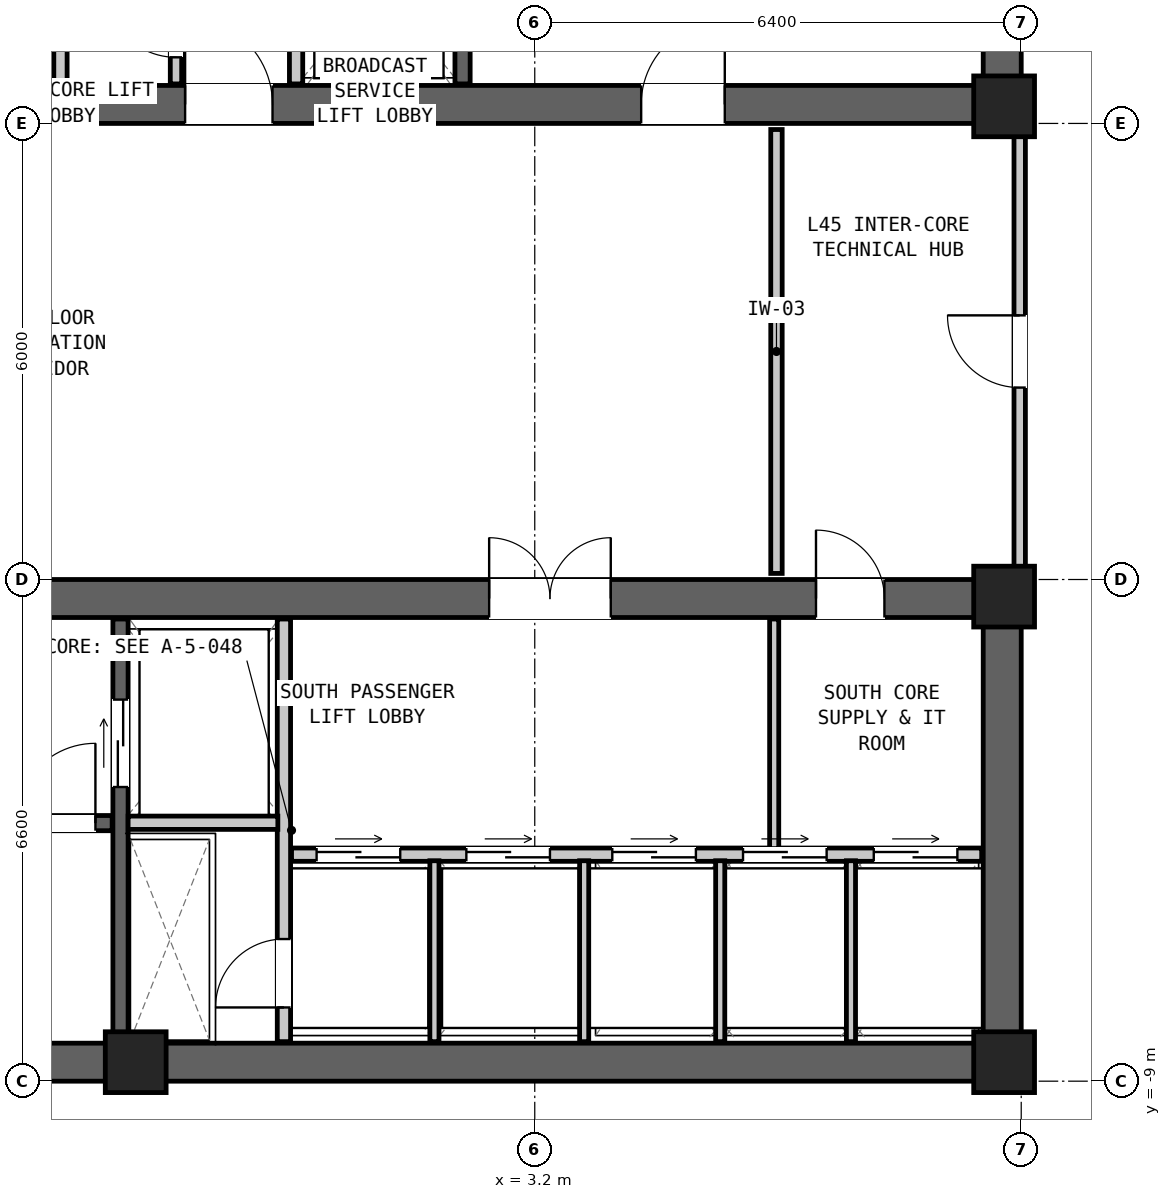
"""IFC4 building model, lengths in metres.
Left out: names, types, materials, properties, quantities, classifications, styles, units other than length and angle.
Written with IfcOpenShell. Run it as: python <this file> out.ifc"""

import sys

from ifc_helpers import new_model, si_unit, direction, frame, frame_2d, origin, origin_2d, place, context, subcontext, project, spatial, rectangle, extrude, element, fill, save


model = new_model("IFC4")
c1 = context("Model", 3, precision=1e-05, world=origin(), true_north=direction((0.0, 1.0)))
c2 = subcontext(c1, "Body", "Model", "MODEL_VIEW")
j1 = project(units=[si_unit("LENGTHUNIT", "METRE"), si_unit("PLANEANGLEUNIT", "RADIAN")], contexts=[c1])
p1 = place(None, origin())
s1 = spatial("IfcSite", under=j1, at=p1, CompositionType="ELEMENT")
p2 = place(p1, origin())
s2 = spatial("IfcBuilding", under=s1, at=p2, CompositionType="ELEMENT")
p3 = place(p2, frame((0.0, 0.0, 156.15)))
s3 = spatial("IfcBuildingStorey", under=s2, at=p3, CompositionType="ELEMENT", Elevation=156.15)
p4 = place(p3, frame((-9.6, 3.85, 0.0), z_axis=(0.0, 0.0, 1.0), x_axis=(1.0, 0.0, 0.0)))
e1 = element("IfcWall", 1, at=p4, inside=s3, PredefinedType="SHEAR", context=c2, shape_type="SweptSolid", body=[
    extrude(rectangle(XDim=19.2, YDim=0.5, at=frame_2d((9.6, 0.0))), origin(), (0.0, 0.0, 1.0), 3.05),
])
p5 = place(p4, frame((14.2, 0.0, 0.0)))
e2 = element("IfcOpeningElement", 2, at=p5, cuts=e1, PredefinedType="OPENING", context=c2, shape_type="SweptSolid", body=[
    extrude(rectangle(XDim=1.1, YDim=2.08, at=frame_2d((0.55, 1.04))), frame((0.0, 0.262, 0.0), z_axis=(0.0, -1.0, 0.0), x_axis=(1.0, 0.0, 0.0)), (0.0, 0.0, 1.0), 0.524),
])
p6 = place(p4, frame((8.2, 0.0, 0.0)))
e3 = element("IfcOpeningElement", 3, at=p6, cuts=e1, PredefinedType="OPENING", context=c2, shape_type="SweptSolid", body=[
    extrude(rectangle(XDim=1.15, YDim=2.1, at=frame_2d((0.575, 1.05))), frame((0.0, 0.262, 0.0), z_axis=(0.0, -1.0, 0.0), x_axis=(1.0, 0.0, 0.0)), (0.0, 0.0, 1.0), 0.524),
])
p7 = place(p4, frame((2.5, 0.0, 0.0)))
e4 = element("IfcOpeningElement", 4, at=p7, cuts=e1, PredefinedType="OPENING", context=c2, shape_type="SweptSolid", body=[
    extrude(rectangle(XDim=1.6, YDim=2.12, at=frame_2d((0.8, 1.06))), frame((0.0, 0.262, 0.0), z_axis=(0.0, -1.0, 0.0), x_axis=(1.0, 0.0, 0.0)), (0.0, 0.0, 1.0), 0.524),
])
p8 = place(p3, frame((9.35, 3.6, 0.0), z_axis=(0.0, 0.0, 1.0), x_axis=(0.0, 1.0, 0.0)))
e5 = element("IfcWall", 5, at=p8, inside=s3, PredefinedType="SHEAR", context=c2, shape_type="SweptSolid", body=[
    extrude(rectangle(XDim=6.6, YDim=0.5, at=frame_2d((3.3, 0.0))), origin(), (0.0, 0.0, 1.0), 3.05),
])
p9 = place(p3, frame((-9.6, -8.75, 0.0), z_axis=(0.0, 0.0, 1.0), x_axis=(1.0, 0.0, 0.0)))
e6 = element("IfcWall", 6, at=p9, inside=s3, PredefinedType="SHEAR", context=c2, shape_type="SweptSolid", body=[
    extrude(rectangle(XDim=19.2, YDim=0.5, at=frame_2d((9.6, 0.0))), origin(), (0.0, 0.0, 1.0), 3.05),
])
p10 = place(p3, frame((-9.6, -2.65, 0.0), z_axis=(0.0, 0.0, 1.0), x_axis=(1.0, 0.0, 0.0)))
e7 = element("IfcWall", 7, at=p10, inside=s3, PredefinedType="SHEAR", context=c2, shape_type="SweptSolid", body=[
    extrude(rectangle(XDim=19.2, YDim=0.5, at=frame_2d((9.6, 0.0))), origin(), (0.0, 0.0, 1.0), 3.05),
])
p11 = place(p10, frame((3.8, 0.0, 0.0)))
e8 = element("IfcOpeningElement", 8, at=p11, cuts=e7, PredefinedType="OPENING", context=c2, shape_type="SweptSolid", body=[
    extrude(rectangle(XDim=1.1, YDim=2.08, at=frame_2d((0.55, 1.04))), frame((0.0, 0.262, 0.0), z_axis=(0.0, -1.0, 0.0), x_axis=(1.0, 0.0, 0.0)), (0.0, 0.0, 1.0), 0.524),
])
p12 = place(p10, frame((12.2, 0.0, 0.0)))
e9 = element("IfcOpeningElement", 9, at=p12, cuts=e7, PredefinedType="OPENING", context=c2, shape_type="SweptSolid", body=[
    extrude(rectangle(XDim=1.6, YDim=2.12, at=frame_2d((0.8, 1.06))), frame((0.0, 0.262, 0.0), z_axis=(0.0, -1.0, 0.0), x_axis=(1.0, 0.0, 0.0)), (0.0, 0.0, 1.0), 0.524),
])
p13 = place(p10, frame((16.5, 0.0, 0.0)))
e10 = element("IfcOpeningElement", 10, at=p13, cuts=e7, PredefinedType="OPENING", context=c2, shape_type="SweptSolid", body=[
    extrude(rectangle(XDim=0.9, YDim=2.05, at=frame_2d((0.45, 1.025))), frame((0.0, 0.262, 0.0), z_axis=(0.0, -1.0, 0.0), x_axis=(1.0, 0.0, 0.0)), (0.0, 0.0, 1.0), 0.524),
])
p14 = place(p3, frame((9.35, -9.0, 0.0), z_axis=(0.0, 0.0, 1.0), x_axis=(0.0, 1.0, 0.0)))
e11 = element("IfcWall", 11, at=p14, inside=s3, PredefinedType="SHEAR", context=c2, shape_type="SweptSolid", body=[
    extrude(rectangle(XDim=6.6, YDim=0.5, at=frame_2d((3.3, 0.0))), origin(), (0.0, 0.0, 1.0), 3.05),
])
for number, where, z_axis, x_axis in (
    (12, (9.375, 3.825, 0.0), (0.0, 0.0, 1.0), (1.0, 0.0, 0.0)),
    (13, (9.375, -2.625, 0.0), (0.0, 0.0, 1.0), (1.0, 0.0, 0.0)),
    (14, (-2.05, -8.75, 0.0), (0.0, 0.0, 1.0), (1.0, 0.0, 0.0)),
    (15, (9.375, -8.75, 0.0), (0.0, 0.0, 1.0), (1.0, 0.0, 0.0)),
):
    element("IfcColumn", number, at=place(p3, frame(where, z_axis=z_axis, x_axis=x_axis)), inside=s3, PredefinedType="COLUMN", context=c2, shape_type="SweptSolid", body=[
        extrude(rectangle(XDim=0.8, YDim=0.8, at=origin_2d()), origin(), (0.0, 0.0, 1.0), 3.05),
    ])
p15 = place(p3, frame((2.25, 4.12, 0.0), z_axis=(0.0, 0.0, 1.0), x_axis=(0.0, 1.0, 0.0)))
e16 = element("IfcWall", 16, at=p15, inside=s3, PredefinedType="SHEAR", context=c2, shape_type="SweptSolid", body=[
    extrude(rectangle(XDim=5.56, YDim=0.2, at=frame_2d((2.78, 0.0))), origin(), (0.0, 0.0, 1.0), 2.83),
])
p16 = place(p15, frame((0.65, 0.0, 0.0)))
e17 = element("IfcOpeningElement", 17, at=p16, cuts=e16, PredefinedType="OPENING", context=c2, shape_type="SweptSolid", body=[
    extrude(rectangle(XDim=1.15, YDim=2.08, at=frame_2d((0.575, 1.04))), frame((0.0, 0.112, 0.0), z_axis=(0.0, -1.0, 0.0), x_axis=(1.0, 0.0, 0.0)), (0.0, 0.0, 1.0), 0.224),
])
p17 = place(p3, frame((0.06, 4.12, 0.0), z_axis=(0.0, 0.0, 1.0), x_axis=(0.0, 1.0, 0.0)))
e18 = element("IfcWall", 18, at=p17, inside=s3, PredefinedType="PARTITIONING", context=c2, shape_type="SweptSolid", body=[
    extrude(rectangle(XDim=5.56, YDim=0.175, at=frame_2d((2.78, 0.0))), origin(), (0.0, 0.0, 1.0), 2.83),
])
p18 = place(p17, frame((3.1, 0.0, 0.0)))
e19 = element("IfcOpeningElement", 19, at=p18, cuts=e18, PredefinedType="OPENING", context=c2, shape_type="SweptSolid", body=[
    extrude(rectangle(XDim=1.4, YDim=2.12, at=frame_2d((0.7, 1.06))), frame((0.0, 0.1, 0.0), z_axis=(0.0, -1.0, 0.0), x_axis=(1.0, 0.0, 0.0)), (0.0, 0.0, 1.0), 0.199),
])
p19 = place(p3, frame((-3.04, 4.12, 0.0), z_axis=(0.0, 0.0, 1.0), x_axis=(0.0, 1.0, 0.0)))
e20 = element("IfcWall", 20, at=p19, inside=s3, PredefinedType="PARTITIONING", context=c2, shape_type="SweptSolid", body=[
    extrude(rectangle(XDim=5.56, YDim=0.175, at=frame_2d((2.78, 0.0))), origin(), (0.0, 0.0, 1.0), 2.83),
])
p20 = place(p3, frame((-1.52, 4.12, 0.0), z_axis=(0.0, 0.0, 1.0), x_axis=(0.0, 1.0, 0.0)))
e21 = element("IfcWall", 21, at=p20, inside=s3, PredefinedType="PARTITIONING", context=c2, shape_type="SweptSolid", body=[
    extrude(rectangle(XDim=5.56, YDim=0.15, at=frame_2d((2.78, 0.0))), origin(), (0.0, 0.0, 1.0), 2.83),
])
p21 = place(p20, frame((3.95, 0.0, 0.0)))
e22 = element("IfcOpeningElement", 22, at=p21, cuts=e21, PredefinedType="OPENING", context=c2, shape_type="SweptSolid", body=[
    extrude(rectangle(XDim=0.9, YDim=2.05, at=frame_2d((0.45, 1.025))), frame((0.0, 0.087, 0.0), z_axis=(0.0, -1.0, 0.0), x_axis=(1.0, 0.0, 0.0)), (0.0, 0.0, 1.0), 0.174),
])
p22 = place(p20, frame((2.2, 0.0, 0.0)))
e23 = element("IfcOpeningElement", 23, at=p22, cuts=e21, PredefinedType="OPENING", context=c2, shape_type="SweptSolid", body=[
    extrude(rectangle(XDim=0.9, YDim=2.05, at=frame_2d((0.45, 1.025))), frame((0.0, 0.087, 0.0), z_axis=(0.0, -1.0, 0.0), x_axis=(1.0, 0.0, 0.0)), (0.0, 0.0, 1.0), 0.174),
])
p23 = place(p20, frame((0.35, 0.0, 0.0)))
e24 = element("IfcOpeningElement", 24, at=p23, cuts=e21, PredefinedType="OPENING", context=c2, shape_type="SweptSolid", body=[
    extrude(rectangle(XDim=0.92, YDim=2.1, at=frame_2d((0.46, 1.05))), frame((0.0, 0.087, 0.0), z_axis=(0.0, -1.0, 0.0), x_axis=(1.0, 0.0, 0.0)), (0.0, 0.0, 1.0), 0.174),
])
p24 = place(p3, frame((-9.08, -5.605, 0.0), z_axis=(0.0, 0.0, 1.0), x_axis=(1.0, 0.0, 0.0)))
e25 = element("IfcWall", 25, at=p24, inside=s3, PredefinedType="SHEAR", context=c2, shape_type="SweptSolid", body=[
    extrude(rectangle(XDim=6.72, YDim=0.2, at=frame_2d((3.36, 0.0))), origin(), (0.0, 0.0, 1.0), 2.83),
])
p25 = place(p24, frame((5.45, 0.0, 0.0)))
e26 = element("IfcOpeningElement", 26, at=p25, cuts=e25, PredefinedType="OPENING", context=c2, shape_type="SweptSolid", body=[
    extrude(rectangle(XDim=1.05, YDim=2.08, at=frame_2d((0.525, 1.04))), frame((0.0, 0.112, 0.0), z_axis=(0.0, -1.0, 0.0), x_axis=(1.0, 0.0, 0.0)), (0.0, 0.0, 1.0), 0.224),
])
p26 = place(p3, frame((-2.25, -8.48, 0.0), z_axis=(0.0, 0.0, 1.0), x_axis=(0.0, 1.0, 0.0)))
e27 = element("IfcWall", 27, at=p26, inside=s3, PredefinedType="SHEAR", context=c2, shape_type="SweptSolid", body=[
    extrude(rectangle(XDim=5.56, YDim=0.2, at=frame_2d((2.78, 0.0))), origin(), (0.0, 0.0, 1.0), 2.83),
])
p27 = place(p26, frame((3.35, 0.0, 0.0)))
e28 = element("IfcOpeningElement", 28, at=p27, cuts=e27, PredefinedType="OPENING", context=c2, shape_type="SweptSolid", body=[
    extrude(rectangle(XDim=1.15, YDim=2.08, at=frame_2d((0.575, 1.04))), frame((0.0, 0.112, 0.0), z_axis=(0.0, -1.0, 0.0), x_axis=(1.0, 0.0, 0.0)), (0.0, 0.0, 1.0), 0.224),
])
p28 = place(p3, frame((-0.1, -8.48, 0.0), z_axis=(0.0, 0.0, 1.0), x_axis=(0.0, 1.0, 0.0)))
e29 = element("IfcWall", 29, at=p28, inside=s3, PredefinedType="PARTITIONING", context=c2, shape_type="SweptSolid", body=[
    extrude(rectangle(XDim=5.56, YDim=0.175, at=frame_2d((2.78, 0.0))), origin(), (0.0, 0.0, 1.0), 2.83),
])
p29 = place(p28, frame((0.45, 0.0, 0.0)))
e30 = element("IfcOpeningElement", 30, at=p29, cuts=e29, PredefinedType="OPENING", context=c2, shape_type="SweptSolid", body=[
    extrude(rectangle(XDim=0.9, YDim=2.05, at=frame_2d((0.45, 1.025))), frame((0.0, 0.1, 0.0), z_axis=(0.0, -1.0, 0.0), x_axis=(1.0, 0.0, 0.0)), (0.0, 0.0, 1.0), 0.199),
])
p30 = place(p3, frame((-2.15, -5.6, 0.0), z_axis=(0.0, 0.0, 1.0), x_axis=(1.0, 0.0, 0.0)))
e31 = element("IfcWall", 31, at=p30, inside=s3, PredefinedType="PARTITIONING", context=c2, shape_type="SweptSolid", body=[
    extrude(rectangle(XDim=1.97, YDim=0.175, at=frame_2d((0.985, 0.0))), origin(), (0.0, 0.0, 1.0), 2.83),
])
p31 = place(p3, frame((0.0, -6.02, 0.0), z_axis=(0.0, 0.0, 1.0), x_axis=(1.0, 0.0, 0.0)))
e32 = element("IfcWall", 32, at=p31, inside=s3, PredefinedType="PARTITIONING", context=c2, shape_type="SweptSolid", body=[
    extrude(rectangle(XDim=9.08, YDim=0.175, at=frame_2d((4.54, 0.0))), origin(), (0.0, 0.0, 1.0), 2.83),
])
p32 = place(p31, frame((0.33, 0.0, 0.0)))
e33 = element("IfcOpeningElement", 33, at=p32, cuts=e32, PredefinedType="OPENING", context=c2, shape_type="SweptSolid", body=[
    extrude(rectangle(XDim=1.1, YDim=2.06, at=frame_2d((0.55, 1.03))), frame((0.0, 0.1, 0.0), z_axis=(0.0, -1.0, 0.0), x_axis=(1.0, 0.0, 0.0)), (0.0, 0.0, 1.0), 0.199),
])
p33 = place(p31, frame((2.3, 0.0, 0.0)))
e34 = element("IfcOpeningElement", 34, at=p33, cuts=e32, PredefinedType="OPENING", context=c2, shape_type="SweptSolid", body=[
    extrude(rectangle(XDim=1.1, YDim=2.06, at=frame_2d((0.55, 1.03))), frame((0.0, 0.1, 0.0), z_axis=(0.0, -1.0, 0.0), x_axis=(1.0, 0.0, 0.0)), (0.0, 0.0, 1.0), 0.199),
])
p34 = place(p31, frame((4.22, 0.0, 0.0)))
e35 = element("IfcOpeningElement", 35, at=p34, cuts=e32, PredefinedType="OPENING", context=c2, shape_type="SweptSolid", body=[
    extrude(rectangle(XDim=1.1, YDim=2.06, at=frame_2d((0.55, 1.03))), frame((0.0, 0.1, 0.0), z_axis=(0.0, -1.0, 0.0), x_axis=(1.0, 0.0, 0.0)), (0.0, 0.0, 1.0), 0.199),
])
p35 = place(p31, frame((5.94, 0.0, 0.0)))
e36 = element("IfcOpeningElement", 36, at=p35, cuts=e32, PredefinedType="OPENING", context=c2, shape_type="SweptSolid", body=[
    extrude(rectangle(XDim=1.1, YDim=2.06, at=frame_2d((0.55, 1.03))), frame((0.0, 0.1, 0.0), z_axis=(0.0, -1.0, 0.0), x_axis=(1.0, 0.0, 0.0)), (0.0, 0.0, 1.0), 0.199),
])
p36 = place(p31, frame((7.66, 0.0, 0.0)))
e37 = element("IfcOpeningElement", 37, at=p36, cuts=e32, PredefinedType="OPENING", context=c2, shape_type="SweptSolid", body=[
    extrude(rectangle(XDim=1.1, YDim=2.06, at=frame_2d((0.55, 1.03))), frame((0.0, 0.1, 0.0), z_axis=(0.0, -1.0, 0.0), x_axis=(1.0, 0.0, 0.0)), (0.0, 0.0, 1.0), 0.199),
])
for number, where, z_axis, x_axis in (
    (38, (1.88, -8.48, 0.0), (0.0, 0.0, 1.0), (0.0, 1.0, 0.0)),
    (39, (3.85, -8.48, 0.0), (0.0, 0.0, 1.0), (0.0, 1.0, 0.0)),
    (40, (5.64, -8.48, 0.0), (0.0, 0.0, 1.0), (0.0, 1.0, 0.0)),
    (41, (7.36, -8.48, 0.0), (0.0, 0.0, 1.0), (0.0, 1.0, 0.0)),
):
    element("IfcWall", number, at=place(p3, frame(where, z_axis=z_axis, x_axis=x_axis)), inside=s3, PredefinedType="PARTITIONING", context=c2, shape_type="SweptSolid", body=[
        extrude(rectangle(XDim=2.38, YDim=0.12, at=frame_2d((1.19, 0.0))), origin(), (0.0, 0.0, 1.0), 2.83),
    ])
p37 = place(p3, frame((6.35, -5.94, 0.0), z_axis=(0.0, 0.0, 1.0), x_axis=(0.0, 1.0, 0.0)))
e42 = element("IfcWall", 42, at=p37, inside=s3, PredefinedType="PARTITIONING", context=c2, shape_type="SweptSolid", body=[
    extrude(rectangle(XDim=3.02, YDim=0.12, at=frame_2d((1.51, 0.0))), origin(), (0.0, 0.0, 1.0), 2.83),
])
p38 = place(p3, frame((6.38, -2.32, 0.0), z_axis=(0.0, 0.0, 1.0), x_axis=(0.0, 1.0, 0.0)))
e43 = element("IfcWall", 43, at=p38, inside=s3, PredefinedType="PARTITIONING", context=c2, shape_type="SweptSolid", body=[
    extrude(rectangle(XDim=5.84, YDim=0.15, at=frame_2d((2.92, 0.0))), origin(), (0.0, 0.0, 1.0), 2.198),
])
p39 = place(p3, frame((9.58, -2.32, 0.0), z_axis=(0.0, 0.0, 1.0), x_axis=(0.0, 1.0, 0.0)))
e44 = element("IfcWall", 44, at=p39, inside=s3, PredefinedType="PARTITIONING", context=c2, shape_type="SweptSolid", body=[
    extrude(rectangle(XDim=5.84, YDim=0.15, at=frame_2d((2.92, 0.0))), origin(), (0.0, 0.0, 1.0), 2.198),
])
p40 = place(p39, frame((2.445, 0.0, 0.0)))
e45 = element("IfcOpeningElement", 45, at=p40, cuts=e44, PredefinedType="OPENING", context=c2, shape_type="SweptSolid", body=[
    extrude(rectangle(XDim=0.95, YDim=2.1, at=frame_2d((0.475, 1.05))), frame((0.0, 0.087, 0.0), z_axis=(0.0, -1.0, 0.0), x_axis=(1.0, 0.0, 0.0)), (0.0, 0.0, 1.0), 0.174),
])
p41 = place(p5, origin())
e46 = element("IfcDoor", 46, at=p41, inside=s3, OperationType="SINGLE_SWING_RIGHT", PredefinedType="DOOR", context=c2, shape_type="SweptSolid", body=[
    extrude(rectangle(XDim=1.1, YDim=2.08, at=frame_2d((0.55, 1.04))), frame((0.0, 0.025, 0.0), z_axis=(0.0, -1.0, 0.0), x_axis=(1.0, 0.0, 0.0)), (0.0, 0.0, 1.0), 0.05),
])
fill(e2, e46)
p42 = place(p6, origin())
e47 = element("IfcDoor", 47, at=p42, inside=s3, OperationType="SINGLE_SWING_LEFT", PredefinedType="DOOR", context=c2, shape_type="SweptSolid", body=[
    extrude(rectangle(XDim=1.15, YDim=2.1, at=frame_2d((0.575, 1.05))), frame((0.0, 0.025, 0.0), z_axis=(0.0, -1.0, 0.0), x_axis=(1.0, 0.0, 0.0)), (0.0, 0.0, 1.0), 0.05),
])
fill(e3, e47)
p43 = place(p23, origin())
e48 = element("IfcDoor", 48, at=p43, inside=s3, OperationType="SINGLE_SWING_RIGHT", PredefinedType="DOOR", context=c2, shape_type="SweptSolid", body=[
    extrude(rectangle(XDim=0.92, YDim=2.1, at=frame_2d((0.46, 1.05))), frame((0.0, 0.025, 0.0), z_axis=(0.0, -1.0, 0.0), x_axis=(1.0, 0.0, 0.0)), (0.0, 0.0, 1.0), 0.05),
])
fill(e24, e48)
p44 = place(p25, origin())
e49 = element("IfcDoor", 49, at=p44, inside=s3, OperationType="SINGLE_SWING_RIGHT", PredefinedType="DOOR", context=c2, shape_type="SweptSolid", body=[
    extrude(rectangle(XDim=1.05, YDim=2.08, at=frame_2d((0.525, 1.04))), frame((0.0, 0.025, 0.0), z_axis=(0.0, -1.0, 0.0), x_axis=(1.0, 0.0, 0.0)), (0.0, 0.0, 1.0), 0.05),
])
fill(e26, e49)
p45 = place(p27, origin())
e50 = element("IfcDoor", 50, at=p45, inside=s3, OperationType="DOUBLE_DOOR_SLIDING", PredefinedType="DOOR", context=c2, shape_type="SweptSolid", body=[
    extrude(rectangle(XDim=1.15, YDim=2.08, at=frame_2d((0.575, 1.04))), frame((0.0, 0.025, 0.0), z_axis=(0.0, -1.0, 0.0), x_axis=(1.0, 0.0, 0.0)), (0.0, 0.0, 1.0), 0.05),
])
fill(e28, e50)
p46 = place(p29, origin())
e51 = element("IfcDoor", 51, at=p46, inside=s3, OperationType="SINGLE_SWING_LEFT", PredefinedType="DOOR", context=c2, shape_type="SweptSolid", body=[
    extrude(rectangle(XDim=0.9, YDim=2.05, at=frame_2d((0.45, 1.025))), frame((0.0, 0.025, 0.0), z_axis=(0.0, -1.0, 0.0), x_axis=(1.0, 0.0, 0.0)), (0.0, 0.0, 1.0), 0.05),
])
fill(e30, e51)
p47 = place(p32, origin())
e52 = element("IfcDoor", 52, at=p47, inside=s3, OperationType="DOUBLE_DOOR_SLIDING", PredefinedType="DOOR", context=c2, shape_type="SweptSolid", body=[
    extrude(rectangle(XDim=1.1, YDim=2.06, at=frame_2d((0.55, 1.03))), frame((0.0, 0.025, 0.0), z_axis=(0.0, -1.0, 0.0), x_axis=(1.0, 0.0, 0.0)), (0.0, 0.0, 1.0), 0.05),
])
fill(e33, e52)
p48 = place(p33, origin())
e53 = element("IfcDoor", 53, at=p48, inside=s3, OperationType="DOUBLE_DOOR_SLIDING", PredefinedType="DOOR", context=c2, shape_type="SweptSolid", body=[
    extrude(rectangle(XDim=1.1, YDim=2.06, at=frame_2d((0.55, 1.03))), frame((0.0, 0.025, 0.0), z_axis=(0.0, -1.0, 0.0), x_axis=(1.0, 0.0, 0.0)), (0.0, 0.0, 1.0), 0.05),
])
fill(e34, e53)
p49 = place(p12, origin())
e54 = element("IfcDoor", 54, at=p49, inside=s3, OperationType="DOUBLE_DOOR_SINGLE_SWING", PredefinedType="DOOR", context=c2, shape_type="SweptSolid", body=[
    extrude(rectangle(XDim=1.6, YDim=2.12, at=frame_2d((0.8, 1.06))), frame((0.0, 0.025, 0.0), z_axis=(0.0, -1.0, 0.0), x_axis=(1.0, 0.0, 0.0)), (0.0, 0.0, 1.0), 0.05),
])
fill(e9, e54)
p50 = place(p13, origin())
e55 = element("IfcDoor", 55, at=p50, inside=s3, OperationType="SINGLE_SWING_LEFT", PredefinedType="DOOR", context=c2, shape_type="SweptSolid", body=[
    extrude(rectangle(XDim=0.9, YDim=2.05, at=frame_2d((0.45, 1.025))), frame((0.0, 0.025, 0.0), z_axis=(0.0, -1.0, 0.0), x_axis=(1.0, 0.0, 0.0)), (0.0, 0.0, 1.0), 0.05),
])
fill(e10, e55)
p51 = place(p40, origin())
e56 = element("IfcDoor", 56, at=p51, inside=s3, OperationType="SINGLE_SWING_RIGHT", PredefinedType="DOOR", context=c2, shape_type="SweptSolid", body=[
    extrude(rectangle(XDim=0.95, YDim=2.1, at=frame_2d((0.475, 1.05))), frame((0.0, 0.025, 0.0), z_axis=(0.0, -1.0, 0.0), x_axis=(1.0, 0.0, 0.0)), (0.0, 0.0, 1.0), 0.05),
])
fill(e45, e56)
p52 = place(p34, origin())
e57 = element("IfcDoor", 57, at=p52, inside=s3, OperationType="DOUBLE_DOOR_SLIDING", PredefinedType="DOOR", context=c2, shape_type="SweptSolid", body=[
    extrude(rectangle(XDim=1.1, YDim=2.06, at=frame_2d((0.55, 1.03))), frame((0.0, 0.025, 0.0), z_axis=(0.0, -1.0, 0.0), x_axis=(1.0, 0.0, 0.0)), (0.0, 0.0, 1.0), 0.05),
])
fill(e35, e57)
p53 = place(p35, origin())
e58 = element("IfcDoor", 58, at=p53, inside=s3, OperationType="DOUBLE_DOOR_SLIDING", PredefinedType="DOOR", context=c2, shape_type="SweptSolid", body=[
    extrude(rectangle(XDim=1.1, YDim=2.06, at=frame_2d((0.55, 1.03))), frame((0.0, 0.025, 0.0), z_axis=(0.0, -1.0, 0.0), x_axis=(1.0, 0.0, 0.0)), (0.0, 0.0, 1.0), 0.05),
])
fill(e36, e58)
p54 = place(p36, origin())
e59 = element("IfcDoor", 59, at=p54, inside=s3, OperationType="DOUBLE_DOOR_SLIDING", PredefinedType="DOOR", context=c2, shape_type="SweptSolid", body=[
    extrude(rectangle(XDim=1.1, YDim=2.06, at=frame_2d((0.55, 1.03))), frame((0.0, 0.025, 0.0), z_axis=(0.0, -1.0, 0.0), x_axis=(1.0, 0.0, 0.0)), (0.0, 0.0, 1.0), 0.05),
])
fill(e37, e59)
save(model, sys.argv[1])
